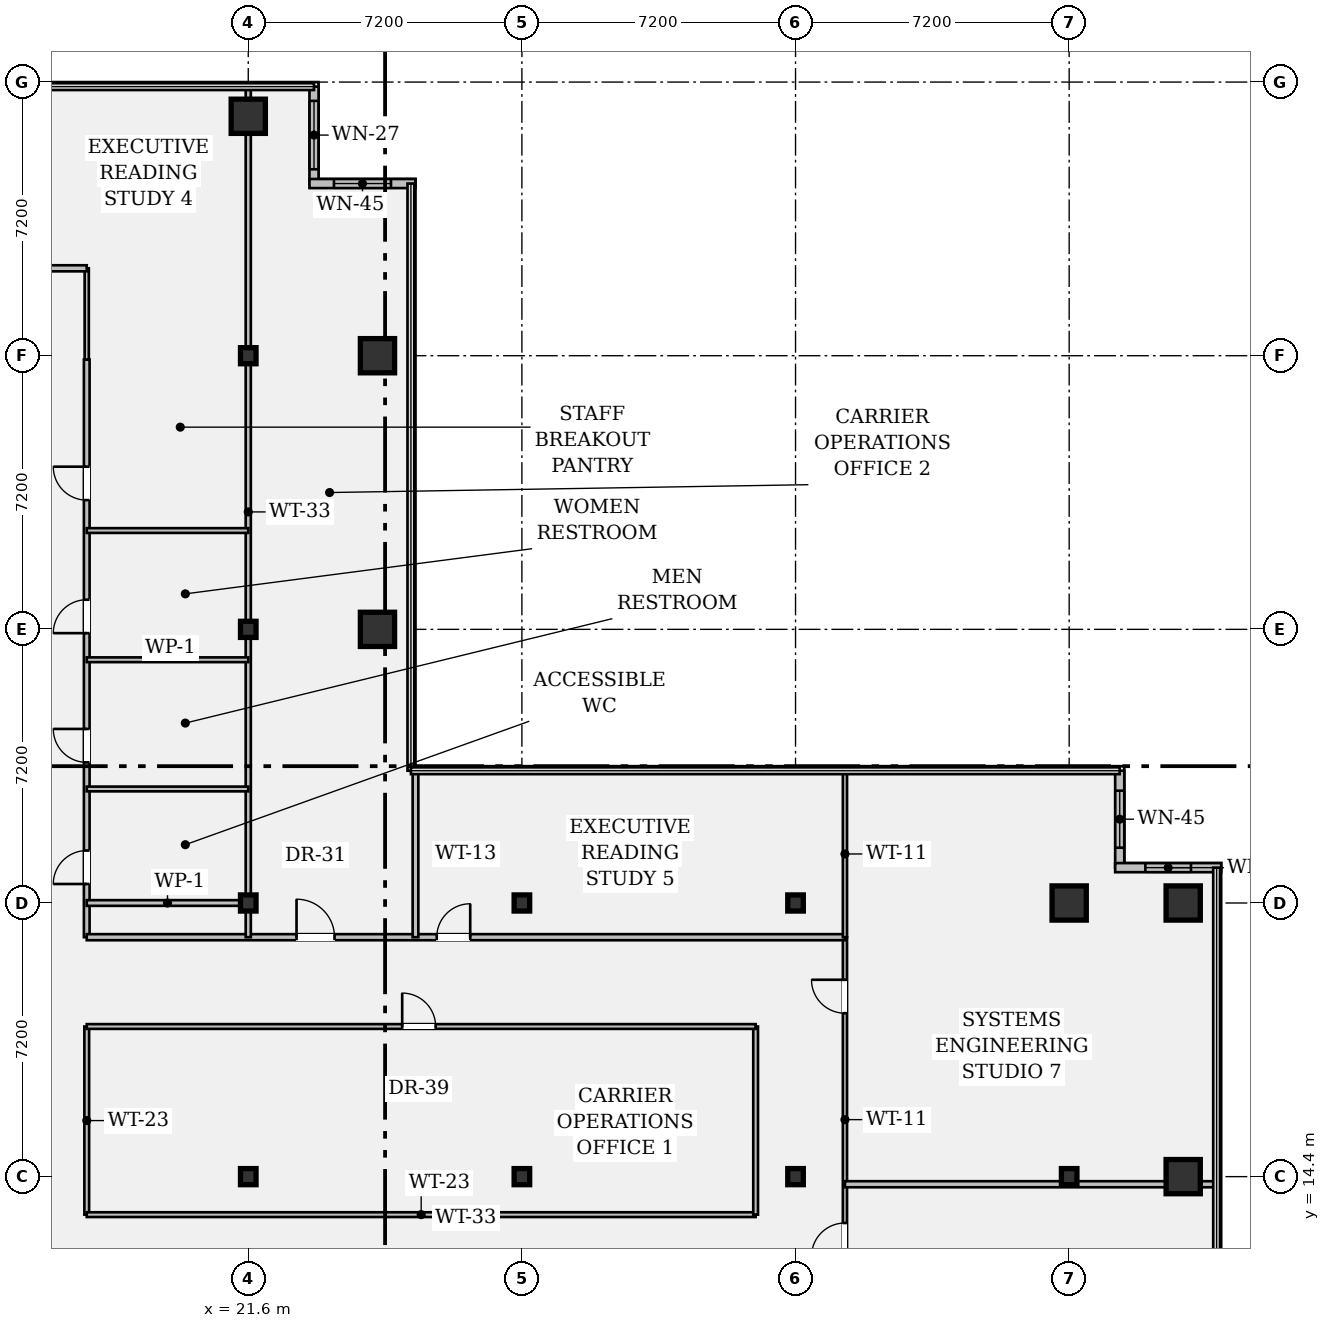
"""IFC4 building model, lengths in metres.
Left out: names, types, materials, properties, quantities, classifications, styles, units other than length and angle.
Written with IfcOpenShell. Run it as: python <this file> out.ifc"""

import sys

from ifc_helpers import new_model, si_unit, direction, frame, frame_2d, origin, origin_2d, place, context, subcontext, project, spatial, rectangle, hollow_rectangle, i_section, extrude, element, fill, save


model = new_model("IFC4")
c1 = context("Model", 3, precision=1e-05, world=origin(), true_north=direction((0.0, 1.0)))
c2 = subcontext(c1, "Body", "Model", "MODEL_VIEW")
j1 = project(units=[si_unit("LENGTHUNIT", "METRE"), si_unit("PLANEANGLEUNIT", "RADIAN")], contexts=[c1])
p1 = place(None, origin())
s1 = spatial("IfcSite", under=j1, at=p1, CompositionType="ELEMENT")
p2 = place(p1, origin())
s2 = spatial("IfcBuilding", under=s1, at=p2, CompositionType="ELEMENT")
p3 = place(p2, frame((0.0, 0.0, 136.85)))
s3 = spatial("IfcBuildingStorey", under=s2, at=p3, CompositionType="ELEMENT", Elevation=136.85)
for number, where, z_axis, x_axis in (
    (1, (21.6, 14.4, 0.0), (0.0, 0.0, 1.0), (1.0, 0.0, 0.0)),
    (2, (21.6, 21.6, 0.0), (0.0, 0.0, 1.0), (1.0, 0.0, 0.0)),
    (3, (21.6, 28.8, 0.0), (0.0, 0.0, 1.0), (1.0, 0.0, 0.0)),
    (4, (21.6, 36.0, 0.0), (0.0, 0.0, 1.0), (1.0, 0.0, 0.0)),
):
    element("IfcColumn", number, at=place(p3, frame(where, z_axis=z_axis, x_axis=x_axis)), inside=s3, PredefinedType="COLUMN", context=c2, shape_type="SweptSolid", body=[
        extrude(i_section(OverallWidth=0.409, OverallDepth=0.424, WebThickness=0.033, FlangeThickness=0.052, FilletRadius=0.018, at=origin_2d()), origin(), (0.0, 0.0, 1.0), 3.58),
    ])
for number, where, z_axis, x_axis in (
    (5, (21.6, 42.3, 0.0), (0.0, 0.0, 1.0), (1.0, 0.0, 0.0)),
    (6, (25.0, 28.8, 0.0), (0.0, 0.0, 1.0), (1.0, 0.0, 0.0)),
    (7, (25.0, 36.0, 0.0), (0.0, 0.0, 1.0), (1.0, 0.0, 0.0)),
):
    element("IfcColumn", number, at=place(p3, frame(where, z_axis=z_axis, x_axis=x_axis)), inside=s3, PredefinedType="COLUMN", context=c2, shape_type="SweptSolid", body=[
        extrude(hollow_rectangle(XDim=0.9, YDim=0.9, WallThickness=0.055, at=origin_2d()), origin(), (0.0, 0.0, 1.0), 3.58),
    ])
for number, where, z_axis, x_axis in (
    (8, (28.8, 14.4, 0.0), (0.0, 0.0, 1.0), (1.0, 0.0, 0.0)),
    (9, (28.8, 21.6, 0.0), (0.0, 0.0, 1.0), (1.0, 0.0, 0.0)),
    (10, (36.0, 14.4, 0.0), (0.0, 0.0, 1.0), (1.0, 0.0, 0.0)),
    (11, (36.0, 21.6, 0.0), (0.0, 0.0, 1.0), (1.0, 0.0, 0.0)),
    (12, (43.2, 14.4, 0.0), (0.0, 0.0, 1.0), (1.0, 0.0, 0.0)),
):
    element("IfcColumn", number, at=place(p3, frame(where, z_axis=z_axis, x_axis=x_axis)), inside=s3, PredefinedType="COLUMN", context=c2, shape_type="SweptSolid", body=[
        extrude(i_section(OverallWidth=0.409, OverallDepth=0.424, WebThickness=0.033, FlangeThickness=0.052, FilletRadius=0.018, at=origin_2d()), origin(), (0.0, 0.0, 1.0), 3.58),
    ])
for number, where, z_axis, x_axis in (
    (13, (43.2, 21.6, 0.0), (0.0, 0.0, 1.0), (1.0, 0.0, 0.0)),
    (14, (46.2, 14.4, 0.0), (0.0, 0.0, 1.0), (1.0, 0.0, 0.0)),
    (15, (46.2, 21.6, 0.0), (0.0, 0.0, 1.0), (1.0, 0.0, 0.0)),
):
    element("IfcColumn", number, at=place(p3, frame(where, z_axis=z_axis, x_axis=x_axis)), inside=s3, PredefinedType="COLUMN", context=c2, shape_type="SweptSolid", body=[
        extrude(hollow_rectangle(XDim=0.9, YDim=0.9, WallThickness=0.055, at=origin_2d()), origin(), (0.0, 0.0, 1.0), 3.58),
    ])
p4 = place(p3, frame((23.33, 43.08, 0.0), z_axis=(0.0, 0.0, 1.0), x_axis=(0.0, -1.0, 0.0)))
e16 = element("IfcWall", 16, at=p4, inside=s3, PredefinedType="STANDARD", context=c2, shape_type="SweptSolid", body=[
    extrude(rectangle(XDim=2.55, YDim=0.24, at=frame_2d((1.275, 0.0))), origin(), (0.0, 0.0, 1.0), 3.58),
])
p5 = place(p4, frame((0.375, 0.0, 0.95)))
e17 = element("IfcOpeningElement", 17, at=p5, cuts=e16, PredefinedType="OPENING", context=c2, shape_type="SweptSolid", body=[
    extrude(rectangle(XDim=1.8, YDim=1.35, at=frame_2d((0.9, 0.675))), frame((0.0, 0.132, 0.0), z_axis=(0.0, -1.0, 0.0), x_axis=(1.0, 0.0, 0.0)), (0.0, 0.0, 1.0), 0.264),
])
p6 = place(p3, frame((23.21, 40.53, 0.0), z_axis=(0.0, 0.0, 1.0), x_axis=(1.0, 0.0, 0.0)))
e18 = element("IfcWall", 18, at=p6, inside=s3, PredefinedType="STANDARD", context=c2, shape_type="SweptSolid", body=[
    extrude(rectangle(XDim=2.79, YDim=0.24, at=frame_2d((1.395, 0.0))), origin(), (0.0, 0.0, 1.0), 3.58),
])
p7 = place(p6, frame((0.645, 0.0, 0.95)))
e19 = element("IfcOpeningElement", 19, at=p7, cuts=e18, PredefinedType="OPENING", context=c2, shape_type="SweptSolid", body=[
    extrude(rectangle(XDim=1.5, YDim=1.8, at=frame_2d((0.75, 0.9))), frame((0.0, 0.132, 0.0), z_axis=(0.0, -1.0, 0.0), x_axis=(1.0, 0.0, 0.0)), (0.0, 0.0, 1.0), 0.264),
])
p8 = place(p3, frame((44.53, 25.08, 0.0), z_axis=(0.0, 0.0, 1.0), x_axis=(0.0, -1.0, 0.0)))
e20 = element("IfcWall", 20, at=p8, inside=s3, PredefinedType="STANDARD", context=c2, shape_type="SweptSolid", body=[
    extrude(rectangle(XDim=2.55, YDim=0.24, at=frame_2d((1.275, 0.0))), origin(), (0.0, 0.0, 1.0), 3.58),
])
p9 = place(p8, frame((0.525, 0.0, 0.95)))
e21 = element("IfcOpeningElement", 21, at=p9, cuts=e20, PredefinedType="OPENING", context=c2, shape_type="SweptSolid", body=[
    extrude(rectangle(XDim=1.5, YDim=1.8, at=frame_2d((0.75, 0.9))), frame((0.0, 0.132, 0.0), z_axis=(0.0, -1.0, 0.0), x_axis=(1.0, 0.0, 0.0)), (0.0, 0.0, 1.0), 0.264),
])
p10 = place(p3, frame((44.41, 22.53, 0.0), z_axis=(0.0, 0.0, 1.0), x_axis=(1.0, 0.0, 0.0)))
e22 = element("IfcWall", 22, at=p10, inside=s3, PredefinedType="STANDARD", context=c2, shape_type="SweptSolid", body=[
    extrude(rectangle(XDim=2.79, YDim=0.24, at=frame_2d((1.395, 0.0))), origin(), (0.0, 0.0, 1.0), 3.58),
])
p11 = place(p10, frame((0.795, 0.0, 0.95)))
e23 = element("IfcOpeningElement", 23, at=p11, cuts=e22, PredefinedType="OPENING", context=c2, shape_type="SweptSolid", body=[
    extrude(rectangle(XDim=1.2, YDim=1.8, at=frame_2d((0.6, 0.9))), frame((0.0, 0.132, 0.0), z_axis=(0.0, -1.0, 0.0), x_axis=(1.0, 0.0, 0.0)), (0.0, 0.0, 1.0), 0.264),
])
p12 = place(p3, frame((17.35, 20.7, 0.0), z_axis=(0.0, 0.0, 1.0), x_axis=(0.0, 1.0, 0.0)))
e24 = element("IfcWall", 24, at=p12, inside=s3, PredefinedType="PARTITIONING", context=c2, shape_type="SweptSolid", body=[
    extrude(rectangle(XDim=15.2, YDim=0.15, at=frame_2d((7.6, 0.0))), origin(), (0.0, 0.0, 1.0), 2.869),
])
p13 = place(p12, frame((1.4, 0.0, 0.0)))
e25 = element("IfcOpeningElement", 25, at=p13, cuts=e24, PredefinedType="OPENING", context=c2, shape_type="SweptSolid", body=[
    extrude(rectangle(XDim=0.88, YDim=2.15, at=frame_2d((0.44, 1.075))), frame((0.0, 0.087, 0.0), z_axis=(0.0, -1.0, 0.0), x_axis=(1.0, 0.0, 0.0)), (0.0, 0.0, 1.0), 0.174),
])
p14 = place(p12, frame((4.6, 0.0, 0.0)))
e26 = element("IfcOpeningElement", 26, at=p14, cuts=e24, PredefinedType="OPENING", context=c2, shape_type="SweptSolid", body=[
    extrude(rectangle(XDim=0.88, YDim=2.15, at=frame_2d((0.44, 1.075))), frame((0.0, 0.087, 0.0), z_axis=(0.0, -1.0, 0.0), x_axis=(1.0, 0.0, 0.0)), (0.0, 0.0, 1.0), 0.174),
])
p15 = place(p12, frame((8.0, 0.0, 0.0)))
e27 = element("IfcOpeningElement", 27, at=p15, cuts=e24, PredefinedType="OPENING", context=c2, shape_type="SweptSolid", body=[
    extrude(rectangle(XDim=0.88, YDim=2.15, at=frame_2d((0.44, 1.075))), frame((0.0, 0.087, 0.0), z_axis=(0.0, -1.0, 0.0), x_axis=(1.0, 0.0, 0.0)), (0.0, 0.0, 1.0), 0.174),
])
p16 = place(p12, frame((11.5, 0.0, 0.0)))
e28 = element("IfcOpeningElement", 28, at=p16, cuts=e24, PredefinedType="OPENING", context=c2, shape_type="SweptSolid", body=[
    extrude(rectangle(XDim=0.88, YDim=2.15, at=frame_2d((0.44, 1.075))), frame((0.0, 0.087, 0.0), z_axis=(0.0, -1.0, 0.0), x_axis=(1.0, 0.0, 0.0)), (0.0, 0.0, 1.0), 0.174),
])
p17 = place(p3, frame((37.3, 11.1, 0.0), z_axis=(0.0, 0.0, 1.0), x_axis=(0.0, 1.0, 0.0)))
e29 = element("IfcWall", 29, at=p17, inside=s3, PredefinedType="PARTITIONING", context=c2, shape_type="SweptSolid", body=[
    extrude(rectangle(XDim=9.6, YDim=0.11, at=frame_2d((4.8, 0.0))), origin(), (0.0, 0.0, 1.0), 2.869),
])
p18 = place(p17, frame((1.2, 0.0, 0.0)))
e30 = element("IfcOpeningElement", 30, at=p18, cuts=e29, PredefinedType="OPENING", context=c2, shape_type="SweptSolid", body=[
    extrude(rectangle(XDim=0.88, YDim=2.15, at=frame_2d((0.44, 1.075))), frame((0.0, 0.067, 0.0), z_axis=(0.0, -1.0, 0.0), x_axis=(1.0, 0.0, 0.0)), (0.0, 0.0, 1.0), 0.134),
])
p19 = place(p17, frame((7.6, 0.0, 0.0)))
e31 = element("IfcOpeningElement", 31, at=p19, cuts=e29, PredefinedType="OPENING", context=c2, shape_type="SweptSolid", body=[
    extrude(rectangle(XDim=0.88, YDim=2.15, at=frame_2d((0.44, 1.075))), frame((0.0, 0.067, 0.0), z_axis=(0.0, -1.0, 0.0), x_axis=(1.0, 0.0, 0.0)), (0.0, 0.0, 1.0), 0.134),
])
p20 = place(p3, frame((17.35, 20.7, 0.0), z_axis=(0.0, 0.0, 1.0), x_axis=(1.0, 0.0, 0.0)))
e32 = element("IfcWall", 32, at=p20, inside=s3, PredefinedType="PARTITIONING", context=c2, shape_type="SweptSolid", body=[
    extrude(rectangle(XDim=19.95, YDim=0.16, at=frame_2d((9.975, 0.0))), origin(), (0.0, 0.0, 1.0), 2.869),
])
p21 = place(p20, frame((5.52, 0.0, 0.0)))
e33 = element("IfcOpeningElement", 33, at=p21, cuts=e32, PredefinedType="OPENING", context=c2, shape_type="SweptSolid", body=[
    extrude(rectangle(XDim=1.0, YDim=2.15, at=frame_2d((0.5, 1.075))), frame((0.0, 0.092, 0.0), z_axis=(0.0, -1.0, 0.0), x_axis=(1.0, 0.0, 0.0)), (0.0, 0.0, 1.0), 0.184),
])
p22 = place(p20, frame((9.21, 0.0, 0.0)))
e34 = element("IfcOpeningElement", 34, at=p22, cuts=e32, PredefinedType="OPENING", context=c2, shape_type="SweptSolid", body=[
    extrude(rectangle(XDim=0.88, YDim=2.15, at=frame_2d((0.44, 1.075))), frame((0.0, 0.092, 0.0), z_axis=(0.0, -1.0, 0.0), x_axis=(1.0, 0.0, 0.0)), (0.0, 0.0, 1.0), 0.184),
])
p23 = place(p3, frame((17.35, 13.4, 0.0), z_axis=(0.0, 0.0, 1.0), x_axis=(0.0, 1.0, 0.0)))
e35 = element("IfcWall", 35, at=p23, inside=s3, PredefinedType="PARTITIONING", context=c2, shape_type="SweptSolid", body=[
    extrude(rectangle(XDim=4.95, YDim=0.125, at=frame_2d((2.475, 0.0))), origin(), (0.0, 0.0, 1.0), 2.869),
])
p24 = place(p3, frame((17.35, 13.4, 0.0), z_axis=(0.0, 0.0, 1.0), x_axis=(1.0, 0.0, 0.0)))
e36 = element("IfcWall", 36, at=p24, inside=s3, PredefinedType="PARTITIONING", context=c2, shape_type="SweptSolid", body=[
    extrude(rectangle(XDim=17.6, YDim=0.125, at=frame_2d((8.8, 0.0))), origin(), (0.0, 0.0, 1.0), 2.869),
])
p25 = place(p3, frame((34.95, 13.4, 0.0), z_axis=(0.0, 0.0, 1.0), x_axis=(0.0, 1.0, 0.0)))
e37 = element("IfcWall", 37, at=p25, inside=s3, PredefinedType="PARTITIONING", context=c2, shape_type="SweptSolid", body=[
    extrude(rectangle(XDim=4.95, YDim=0.125, at=frame_2d((2.475, 0.0))), origin(), (0.0, 0.0, 1.0), 2.869),
])
p26 = place(p3, frame((17.35, 18.35, 0.0), z_axis=(0.0, 0.0, 1.0), x_axis=(1.0, 0.0, 0.0)))
e38 = element("IfcWall", 38, at=p26, inside=s3, PredefinedType="PARTITIONING", context=c2, shape_type="SweptSolid", body=[
    extrude(rectangle(XDim=17.6, YDim=0.125, at=frame_2d((8.8, 0.0))), origin(), (0.0, 0.0, 1.0), 2.869),
])
p27 = place(p26, frame((8.3, 0.0, 0.0)))
e39 = element("IfcOpeningElement", 39, at=p27, cuts=e38, PredefinedType="OPENING", context=c2, shape_type="SweptSolid", body=[
    extrude(rectangle(XDim=0.88, YDim=2.15, at=frame_2d((0.44, 1.075))), frame((0.0, 0.074, 0.0), z_axis=(0.0, -1.0, 0.0), x_axis=(1.0, 0.0, 0.0)), (0.0, 0.0, 1.0), 0.149),
])
p28 = place(p3, frame((17.35, 21.6, 0.0), z_axis=(0.0, 0.0, 1.0), x_axis=(1.0, 0.0, 0.0)))
e40 = element("IfcWall", 40, at=p28, inside=s3, PredefinedType="PARTITIONING", context=c2, shape_type="SweptSolid", body=[
    extrude(rectangle(XDim=4.25, YDim=0.15, at=frame_2d((2.125, 0.0))), origin(), (0.0, 0.0, 1.0), 2.869),
])
p29 = place(p3, frame((21.6, 20.7, 0.0), z_axis=(0.0, 0.0, 1.0), x_axis=(0.0, 1.0, 0.0)))
e41 = element("IfcWall", 41, at=p29, inside=s3, PredefinedType="PARTITIONING", context=c2, shape_type="SweptSolid", body=[
    extrude(rectangle(XDim=22.38, YDim=0.135, at=frame_2d((11.19, 0.0))), origin(), (0.0, 0.0, 1.0), 2.869),
])
for number, where, z_axis, x_axis in (
    (42, (17.35, 24.6, 0.0), (0.0, 0.0, 1.0), (1.0, 0.0, 0.0)),
    (43, (17.35, 28.0, 0.0), (0.0, 0.0, 1.0), (1.0, 0.0, 0.0)),
    (44, (17.35, 31.4, 0.0), (0.0, 0.0, 1.0), (1.0, 0.0, 0.0)),
):
    element("IfcWall", number, at=place(p3, frame(where, z_axis=z_axis, x_axis=x_axis)), inside=s3, PredefinedType="PARTITIONING", context=c2, shape_type="SweptSolid", body=[
        extrude(rectangle(XDim=4.25, YDim=0.125, at=frame_2d((2.125, 0.0))), origin(), (0.0, 0.0, 1.0), 2.869),
    ])
p30 = place(p3, frame((17.35, 35.9, 0.0), z_axis=(0.0, 0.0, 1.0), x_axis=(0.0, 1.0, 0.0)))
e45 = element("IfcWall", 45, at=p30, inside=s3, PredefinedType="PARTITIONING", context=c2, shape_type="SweptSolid", body=[
    extrude(rectangle(XDim=2.4, YDim=0.11, at=frame_2d((1.2, 0.0))), origin(), (0.0, 0.0, 1.0), 2.869),
])
p31 = place(p3, frame((14.4, 38.3, 0.0), z_axis=(0.0, 0.0, 1.0), x_axis=(1.0, 0.0, 0.0)))
e46 = element("IfcWall", 46, at=p31, inside=s3, PredefinedType="PARTITIONING", context=c2, shape_type="SweptSolid", body=[
    extrude(rectangle(XDim=2.95, YDim=0.16, at=frame_2d((1.475, 0.0))), origin(), (0.0, 0.0, 1.0), 2.869),
])
p32 = place(p31, frame((0.85, 0.0, 0.0)))
e47 = element("IfcOpeningElement", 47, at=p32, cuts=e46, PredefinedType="OPENING", context=c2, shape_type="SweptSolid", body=[
    extrude(rectangle(XDim=0.88, YDim=2.15, at=frame_2d((0.44, 1.075))), frame((0.0, 0.092, 0.0), z_axis=(0.0, -1.0, 0.0), x_axis=(1.0, 0.0, 0.0)), (0.0, 0.0, 1.0), 0.184),
])
p33 = place(p3, frame((26.0, 20.7, 0.0), z_axis=(0.0, 0.0, 1.0), x_axis=(0.0, 1.0, 0.0)))
e48 = element("IfcWall", 48, at=p33, inside=s3, PredefinedType="PARTITIONING", context=c2, shape_type="SweptSolid", body=[
    extrude(rectangle(XDim=4.38, YDim=0.15, at=frame_2d((2.19, 0.0))), origin(), (0.0, 0.0, 1.0), 2.869),
])
p34 = place(p3, frame((37.3, 20.7, 0.0), z_axis=(0.0, 0.0, 1.0), x_axis=(0.0, 1.0, 0.0)))
e49 = element("IfcWall", 49, at=p34, inside=s3, PredefinedType="PARTITIONING", context=c2, shape_type="SweptSolid", body=[
    extrude(rectangle(XDim=4.38, YDim=0.11, at=frame_2d((2.19, 0.0))), origin(), (0.0, 0.0, 1.0), 2.869),
])
p35 = place(p3, frame((37.3, 14.2, 0.0), z_axis=(0.0, 0.0, 1.0), x_axis=(1.0, 0.0, 0.0)))
e50 = element("IfcWall", 50, at=p35, inside=s3, PredefinedType="PARTITIONING", context=c2, shape_type="SweptSolid", body=[
    extrude(rectangle(XDim=9.78, YDim=0.16, at=frame_2d((4.89, 0.0))), origin(), (0.0, 0.0, 1.0), 2.869),
])
p36 = place(p5, origin())
e51 = element("IfcWindow", 51, at=p36, inside=s3, PartitioningType="SINGLE_PANEL", PredefinedType="WINDOW", context=c2, shape_type="SweptSolid", body=[
    extrude(rectangle(XDim=1.8, YDim=1.35, at=frame_2d((0.9, 0.675))), frame((0.0, 0.03, 0.0), z_axis=(0.0, -1.0, 0.0), x_axis=(1.0, 0.0, 0.0)), (0.0, 0.0, 1.0), 0.06),
])
fill(e17, e51)
p37 = place(p7, origin())
e52 = element("IfcWindow", 52, at=p37, inside=s3, PartitioningType="SINGLE_PANEL", PredefinedType="WINDOW", context=c2, shape_type="SweptSolid", body=[
    extrude(rectangle(XDim=1.5, YDim=1.8, at=frame_2d((0.75, 0.9))), frame((0.0, 0.03, 0.0), z_axis=(0.0, -1.0, 0.0), x_axis=(1.0, 0.0, 0.0)), (0.0, 0.0, 1.0), 0.06),
])
fill(e19, e52)
p38 = place(p9, origin())
e53 = element("IfcWindow", 53, at=p38, inside=s3, PartitioningType="SINGLE_PANEL", PredefinedType="WINDOW", context=c2, shape_type="SweptSolid", body=[
    extrude(rectangle(XDim=1.5, YDim=1.8, at=frame_2d((0.75, 0.9))), frame((0.0, 0.03, 0.0), z_axis=(0.0, -1.0, 0.0), x_axis=(1.0, 0.0, 0.0)), (0.0, 0.0, 1.0), 0.06),
])
fill(e21, e53)
p39 = place(p11, origin())
e54 = element("IfcWindow", 54, at=p39, inside=s3, PartitioningType="SINGLE_PANEL", PredefinedType="WINDOW", context=c2, shape_type="SweptSolid", body=[
    extrude(rectangle(XDim=1.2, YDim=1.8, at=frame_2d((0.6, 0.9))), frame((0.0, 0.03, 0.0), z_axis=(0.0, -1.0, 0.0), x_axis=(1.0, 0.0, 0.0)), (0.0, 0.0, 1.0), 0.06),
])
fill(e23, e54)
p40 = place(p27, origin())
e55 = element("IfcDoor", 55, at=p40, inside=s3, OperationType="SINGLE_SWING_LEFT", PredefinedType="DOOR", context=c2, shape_type="SweptSolid", body=[
    extrude(rectangle(XDim=0.88, YDim=2.15, at=frame_2d((0.44, 1.075))), frame((0.0, 0.025, 0.0), z_axis=(0.0, -1.0, 0.0), x_axis=(1.0, 0.0, 0.0)), (0.0, 0.0, 1.0), 0.05),
])
fill(e39, e55)
p41 = place(p13, origin())
e56 = element("IfcDoor", 56, at=p41, inside=s3, OperationType="SINGLE_SWING_LEFT", PredefinedType="DOOR", context=c2, shape_type="SweptSolid", body=[
    extrude(rectangle(XDim=0.88, YDim=2.15, at=frame_2d((0.44, 1.075))), frame((0.0, 0.025, 0.0), z_axis=(0.0, -1.0, 0.0), x_axis=(1.0, 0.0, 0.0)), (0.0, 0.0, 1.0), 0.05),
])
fill(e25, e56)
p42 = place(p14, origin())
e57 = element("IfcDoor", 57, at=p42, inside=s3, OperationType="SINGLE_SWING_RIGHT", PredefinedType="DOOR", context=c2, shape_type="SweptSolid", body=[
    extrude(rectangle(XDim=0.88, YDim=2.15, at=frame_2d((0.44, 1.075))), frame((0.0, 0.025, 0.0), z_axis=(0.0, -1.0, 0.0), x_axis=(1.0, 0.0, 0.0)), (0.0, 0.0, 1.0), 0.05),
])
fill(e26, e57)
p43 = place(p15, origin())
e58 = element("IfcDoor", 58, at=p43, inside=s3, OperationType="SINGLE_SWING_LEFT", PredefinedType="DOOR", context=c2, shape_type="SweptSolid", body=[
    extrude(rectangle(XDim=0.88, YDim=2.15, at=frame_2d((0.44, 1.075))), frame((0.0, 0.025, 0.0), z_axis=(0.0, -1.0, 0.0), x_axis=(1.0, 0.0, 0.0)), (0.0, 0.0, 1.0), 0.05),
])
fill(e27, e58)
p44 = place(p16, origin())
e59 = element("IfcDoor", 59, at=p44, inside=s3, OperationType="SINGLE_SWING_RIGHT", PredefinedType="DOOR", context=c2, shape_type="SweptSolid", body=[
    extrude(rectangle(XDim=0.88, YDim=2.15, at=frame_2d((0.44, 1.075))), frame((0.0, 0.025, 0.0), z_axis=(0.0, -1.0, 0.0), x_axis=(1.0, 0.0, 0.0)), (0.0, 0.0, 1.0), 0.05),
])
fill(e28, e59)
p45 = place(p21, origin())
e60 = element("IfcDoor", 60, at=p45, inside=s3, OperationType="SINGLE_SWING_LEFT", PredefinedType="DOOR", context=c2, shape_type="SweptSolid", body=[
    extrude(rectangle(XDim=1.0, YDim=2.15, at=frame_2d((0.5, 1.075))), frame((0.0, 0.025, 0.0), z_axis=(0.0, -1.0, 0.0), x_axis=(1.0, 0.0, 0.0)), (0.0, 0.0, 1.0), 0.05),
])
fill(e33, e60)
p46 = place(p22, origin())
e61 = element("IfcDoor", 61, at=p46, inside=s3, OperationType="SINGLE_SWING_RIGHT", PredefinedType="DOOR", context=c2, shape_type="SweptSolid", body=[
    extrude(rectangle(XDim=0.88, YDim=2.15, at=frame_2d((0.44, 1.075))), frame((0.0, 0.025, 0.0), z_axis=(0.0, -1.0, 0.0), x_axis=(1.0, 0.0, 0.0)), (0.0, 0.0, 1.0), 0.05),
])
fill(e34, e61)
p47 = place(p18, origin())
e62 = element("IfcDoor", 62, at=p47, inside=s3, OperationType="SINGLE_SWING_LEFT", PredefinedType="DOOR", context=c2, shape_type="SweptSolid", body=[
    extrude(rectangle(XDim=0.88, YDim=2.15, at=frame_2d((0.44, 1.075))), frame((0.0, 0.025, 0.0), z_axis=(0.0, -1.0, 0.0), x_axis=(1.0, 0.0, 0.0)), (0.0, 0.0, 1.0), 0.05),
])
fill(e30, e62)
p48 = place(p19, origin())
e63 = element("IfcDoor", 63, at=p48, inside=s3, OperationType="SINGLE_SWING_RIGHT", PredefinedType="DOOR", context=c2, shape_type="SweptSolid", body=[
    extrude(rectangle(XDim=0.88, YDim=2.15, at=frame_2d((0.44, 1.075))), frame((0.0, 0.025, 0.0), z_axis=(0.0, -1.0, 0.0), x_axis=(1.0, 0.0, 0.0)), (0.0, 0.0, 1.0), 0.05),
])
fill(e31, e63)
save(model, sys.argv[1])
